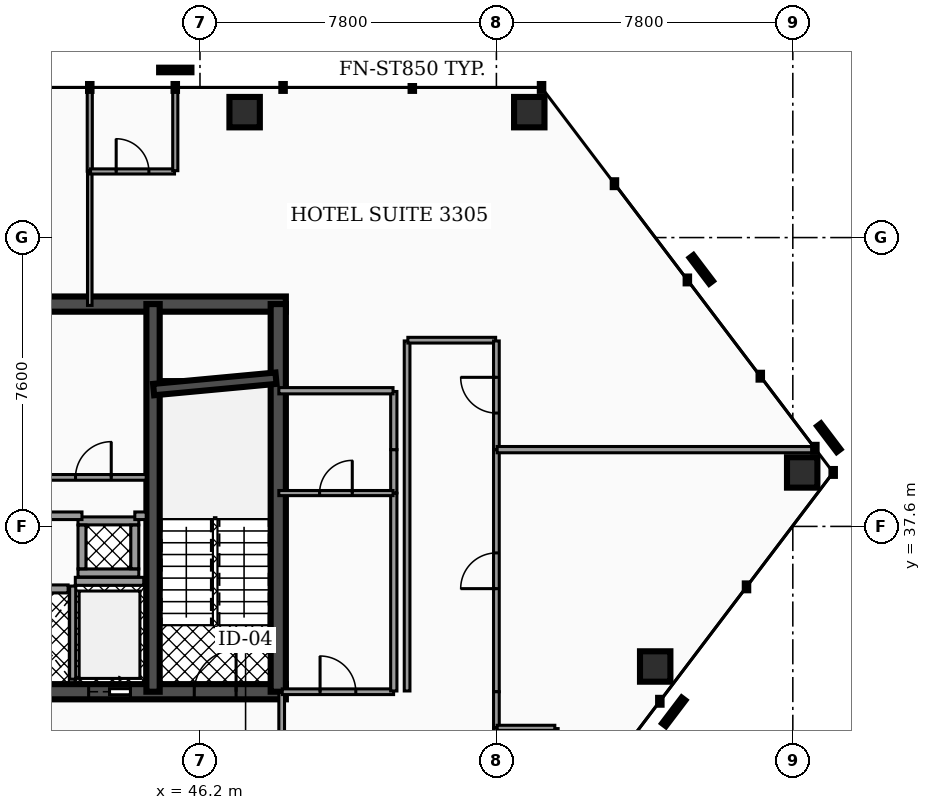
"""IFC4 building model, lengths in metres.
Left out: names, types, materials, properties, quantities, classifications, styles, units other than length and angle.
Written with IfcOpenShell. Run it as: python <this file> out.ifc"""

import sys

from ifc_helpers import new_model, si_unit, direction, frame, frame_2d, origin, origin_2d, place, context, subcontext, project, spatial, rectangle, hollow_rectangle, extrude, element, fill, save


model = new_model("IFC4")
c1 = context("Model", 3, precision=1e-05, world=origin(), true_north=direction((0.0, 1.0)))
c2 = subcontext(c1, "Body", "Model", "MODEL_VIEW")
j1 = project(units=[si_unit("LENGTHUNIT", "METRE"), si_unit("PLANEANGLEUNIT", "RADIAN")], contexts=[c1])
p1 = place(None, origin())
s1 = spatial("IfcSite", under=j1, at=p1, CompositionType="ELEMENT")
p2 = place(p1, origin())
s2 = spatial("IfcBuilding", under=s1, at=p2, CompositionType="ELEMENT")
p3 = place(p2, frame((0.0, 0.0, 138.38)))
s3 = spatial("IfcBuildingStorey", under=s2, at=p3, CompositionType="ELEMENT", Elevation=138.38)
p4 = place(p3, frame((28.4, 43.45, 0.0), z_axis=(0.0, 0.0, 1.0), x_axis=(1.0, 0.0, 0.0)))
e1 = element("IfcWall", 1, at=p4, inside=s3, PredefinedType="SHEAR", context=c2, shape_type="SweptSolid", body=[
    extrude(rectangle(XDim=20.06, YDim=0.4, at=frame_2d((10.03, 0.0))), origin(), (0.0, 0.0, 1.0), 3.5),
])
p5 = place(p3, frame((28.4, 33.25, 0.0), z_axis=(0.0, 0.0, 1.0), x_axis=(1.0, 0.0, 0.0)))
e2 = element("IfcWall", 2, at=p5, inside=s3, PredefinedType="SHEAR", context=c2, shape_type="SweptSolid", body=[
    extrude(rectangle(XDim=20.06, YDim=0.4, at=frame_2d((10.03, 0.0))), origin(), (0.0, 0.0, 1.0), 3.5),
])
p6 = place(p5, frame((4.03, 0.0, 0.0)))
e3 = element("IfcOpeningElement", 3, at=p6, cuts=e2, PredefinedType="OPENING", context=c2, shape_type="SweptSolid", body=[
    extrude(rectangle(XDim=1.1, YDim=2.15, at=frame_2d((0.55, 1.075))), frame((0.0, 0.21, 0.0), z_axis=(0.0, -1.0, 0.0), x_axis=(1.0, 0.0, 0.0)), (0.0, 0.0, 1.0), 0.42),
])
p7 = place(p5, frame((14.87, 0.0, 0.0)))
e4 = element("IfcOpeningElement", 4, at=p7, cuts=e2, PredefinedType="OPENING", context=c2, shape_type="SweptSolid", body=[
    extrude(rectangle(XDim=1.1, YDim=2.15, at=frame_2d((0.55, 1.075))), frame((0.0, 0.21, 0.0), z_axis=(0.0, -1.0, 0.0), x_axis=(1.0, 0.0, 0.0)), (0.0, 0.0, 1.0), 0.42),
])
p8 = place(p5, frame((5.95, 0.0, 0.0)))
e5 = element("IfcOpeningElement", 5, at=p8, cuts=e2, PredefinedType="OPENING", context=c2, shape_type="SweptSolid", body=[
    extrude(rectangle(XDim=1.0, YDim=2.1, at=frame_2d((0.5, 1.05))), frame((0.0, 0.21, 0.0), z_axis=(0.0, -1.0, 0.0), x_axis=(1.0, 0.0, 0.0)), (0.0, 0.0, 1.0), 0.42),
])
p9 = place(p5, frame((7.65, 0.0, 0.0)))
e6 = element("IfcOpeningElement", 6, at=p9, cuts=e2, PredefinedType="OPENING", context=c2, shape_type="SweptSolid", body=[
    extrude(rectangle(XDim=1.0, YDim=2.1, at=frame_2d((0.5, 1.05))), frame((0.0, 0.21, 0.0), z_axis=(0.0, -1.0, 0.0), x_axis=(1.0, 0.0, 0.0)), (0.0, 0.0, 1.0), 0.42),
])
p10 = place(p5, frame((1.31, 0.0, 0.0)))
e7 = element("IfcOpeningElement", 7, at=p10, cuts=e2, PredefinedType="OPENING", context=c2, shape_type="SweptSolid", body=[
    extrude(rectangle(XDim=1.1, YDim=2.2, at=frame_2d((0.55, 1.1))), frame((0.0, 0.21, 0.0), z_axis=(0.0, -1.0, 0.0), x_axis=(1.0, 0.0, 0.0)), (0.0, 0.0, 1.0), 0.42),
])
p11 = place(p5, frame((9.44, 0.0, 0.0)))
e8 = element("IfcOpeningElement", 8, at=p11, cuts=e2, PredefinedType="OPENING", context=c2, shape_type="SweptSolid", body=[
    extrude(rectangle(XDim=1.12, YDim=2.05, at=frame_2d((0.56, 1.025))), frame((0.0, 0.21, 0.0), z_axis=(0.0, -1.0, 0.0), x_axis=(1.0, 0.0, 0.0)), (0.0, 0.0, 1.0), 0.42),
])
p12 = place(p5, frame((17.65, 0.0, 0.0)))
e9 = element("IfcOpeningElement", 9, at=p12, cuts=e2, PredefinedType="OPENING", context=c2, shape_type="SweptSolid", body=[
    extrude(rectangle(XDim=1.1, YDim=2.2, at=frame_2d((0.55, 1.1))), frame((0.0, 0.21, 0.0), z_axis=(0.0, -1.0, 0.0), x_axis=(1.0, 0.0, 0.0)), (0.0, 0.0, 1.0), 0.42),
])
p13 = place(p3, frame((44.965, 33.25, 0.0), z_axis=(0.0, 0.0, 1.0), x_axis=(0.0, 1.0, 0.0)))
e10 = element("IfcWall", 10, at=p13, inside=s3, PredefinedType="SHEAR", context=c2, shape_type="SweptSolid", body=[
    extrude(rectangle(XDim=10.2, YDim=0.35, at=frame_2d((5.1, 0.0))), origin(), (0.0, 0.0, 1.0), 3.5),
])
p14 = place(p3, frame((48.26, 33.25, 0.0), z_axis=(0.0, 0.0, 1.0), x_axis=(0.0, 1.0, 0.0)))
e11 = element("IfcWall", 11, at=p14, inside=s3, PredefinedType="SHEAR", context=c2, shape_type="SweptSolid", body=[
    extrude(rectangle(XDim=10.2, YDim=0.4, at=frame_2d((5.1, 0.0))), origin(), (0.0, 0.0, 1.0), 3.5),
])
p15 = place(p3, frame((44.98, 41.2, 0.0), z_axis=(0.0, 0.0, 1.0), x_axis=(0.995686468965, 0.09278176286, 0.0)))
e12 = element("IfcWall", 12, at=p15, inside=s3, PredefinedType="SHEAR", context=c2, shape_type="SweptSolid", body=[
    extrude(rectangle(XDim=3.234, YDim=0.3, at=frame_2d((1.617, 0.0))), origin(), (0.0, 0.0, 1.0), 3.5),
])
for number, where, z_axis, x_axis in (
    (13, (54.865, 48.5, 0.0), (0.0, 0.0, 1.0), (1.0, 0.0, 0.0)),
    (14, (47.375, 48.5, 0.0), (0.0, 0.0, 1.0), (1.0, 0.0, 0.0)),
    (15, (58.178, 33.914, 0.0), (0.0, 0.0, 1.0), (1.0, 0.0, 0.0)),
    (16, (62.047, 39.02, 0.0), (0.0, 0.0, 1.0), (1.0, 0.0, 0.0)),
):
    element("IfcColumn", number, at=place(p3, frame(where, z_axis=z_axis, x_axis=x_axis)), inside=s3, PredefinedType="COLUMN", context=c2, shape_type="SweptSolid", body=[
        extrude(hollow_rectangle(XDim=0.8, YDim=0.8, WallThickness=0.04, at=origin_2d()), origin(), (0.0, 0.0, 1.0), 3.5),
    ])
p16 = place(p3, frame((42.92, 36.155, 0.0), z_axis=(0.0, 0.0, 1.0), x_axis=(1.0, 0.0, 0.0)))
e17 = element("IfcWall", 17, at=p16, inside=s3, PredefinedType="SOLIDWALL", context=c2, shape_type="SweptSolid", body=[
    extrude(rectangle(XDim=1.8, YDim=0.21, at=frame_2d((0.9, 0.0))), origin(), (0.0, 0.0, 1.0), 2.472),
])
p17 = place(p3, frame((42.85, 33.58, 0.0), z_axis=(0.0, 0.0, 1.0), x_axis=(0.0, 1.0, 0.0)))
e18 = element("IfcWall", 18, at=p17, inside=s3, PredefinedType="SOLIDWALL", context=c2, shape_type="SweptSolid", body=[
    extrude(rectangle(XDim=2.45, YDim=0.16, at=frame_2d((1.225, 0.0))), origin(), (0.0, 0.0, 1.0), 2.472),
])
p18 = place(p3, frame((41.17, 35.955, 0.0), z_axis=(0.0, 0.0, 1.0), x_axis=(1.0, 0.0, 0.0)))
e19 = element("IfcWall", 19, at=p18, inside=s3, PredefinedType="SOLIDWALL", context=c2, shape_type="SweptSolid", body=[
    extrude(rectangle(XDim=1.56, YDim=0.21, at=frame_2d((0.78, 0.0))), origin(), (0.0, 0.0, 1.0), 2.472),
])
for number, where, z_axis, x_axis in (
    (20, (42.99, 36.375, 0.0), (0.0, 0.0, 1.0), (1.0, 0.0, 0.0)),
    (21, (42.99, 37.745, 0.0), (0.0, 0.0, 1.0), (1.0, 0.0, 0.0)),
):
    element("IfcWall", number, at=place(p3, frame(where, z_axis=z_axis, x_axis=x_axis)), inside=s3, PredefinedType="SOLIDWALL", context=c2, shape_type="SweptSolid", body=[
        extrude(rectangle(XDim=1.6, YDim=0.21, at=frame_2d((0.8, 0.0))), origin(), (0.0, 0.0, 1.0), 3.5),
    ])
for number, where, z_axis, x_axis in (
    (22, (43.095, 36.485, 0.0), (0.0, 0.0, 1.0), (0.0, 1.0, 0.0)),
    (23, (44.485, 36.485, 0.0), (0.0, 0.0, 1.0), (0.0, 1.0, 0.0)),
):
    element("IfcWall", number, at=place(p3, frame(where, z_axis=z_axis, x_axis=x_axis)), inside=s3, PredefinedType="SOLIDWALL", context=c2, shape_type="SweptSolid", body=[
        extrude(rectangle(XDim=1.15, YDim=0.21, at=frame_2d((0.575, 0.0))), origin(), (0.0, 0.0, 1.0), 3.5),
    ])
p19 = place(p3, frame((42.005, 38.89, 0.0), z_axis=(0.0, 0.0, 1.0), x_axis=(1.0, 0.0, 0.0)))
e24 = element("IfcWall", 24, at=p19, inside=s3, PredefinedType="PARTITIONING", context=c2, shape_type="SweptSolid", body=[
    extrude(rectangle(XDim=2.78, YDim=0.15, at=frame_2d((1.39, 0.0))), origin(), (0.0, 0.0, 1.0), 2.457),
])
p20 = place(p19, frame((0.92, 0.0, 0.0)))
e25 = element("IfcOpeningElement", 25, at=p20, cuts=e24, PredefinedType="OPENING", context=c2, shape_type="SweptSolid", body=[
    extrude(rectangle(XDim=0.94, YDim=2.05, at=frame_2d((0.47, 1.025))), frame((0.0, 0.085, 0.0), z_axis=(0.0, -1.0, 0.0), x_axis=(1.0, 0.0, 0.0)), (0.0, 0.0, 1.0), 0.17),
])
p21 = place(p3, frame((39.27, 37.88, 0.0), z_axis=(0.0, 0.0, 1.0), x_axis=(1.0, 0.0, 0.0)))
e26 = element("IfcWall", 26, at=p21, inside=s3, PredefinedType="PARTITIONING", context=c2, shape_type="SweptSolid", body=[
    extrude(rectangle(XDim=3.825, YDim=0.2, at=frame_2d((1.913, 0.0))), origin(), (0.0, 0.0, 1.0), 2.457),
])
p22 = place(p3, frame((44.485, 37.88, 0.0), z_axis=(0.0, 0.0, 1.0), x_axis=(1.0, 0.0, 0.0)))
e27 = element("IfcWall", 27, at=p22, inside=s3, PredefinedType="PARTITIONING", context=c2, shape_type="SweptSolid", body=[
    extrude(rectangle(XDim=0.3, YDim=0.2, at=frame_2d((0.15, 0.0))), origin(), (0.0, 0.0, 1.0), 2.457),
])
p23 = place(p3, frame((48.35, 30.17, 0.0), z_axis=(0.0, 0.0, 1.0), x_axis=(0.0, 1.0, 0.0)))
e28 = element("IfcWall", 28, at=p23, inside=s3, PredefinedType="PARTITIONING", context=c2, shape_type="SweptSolid", body=[
    extrude(rectangle(XDim=3.06, YDim=0.15, at=frame_2d((1.53, 0.0))), origin(), (0.0, 0.0, 1.0), 2.457),
])
p24 = place(p23, frame((1.06, 0.0, 0.0)))
e29 = element("IfcOpeningElement", 29, at=p24, cuts=e28, PredefinedType="OPENING", context=c2, shape_type="SweptSolid", body=[
    extrude(rectangle(XDim=0.94, YDim=2.05, at=frame_2d((0.47, 1.025))), frame((0.0, 0.085, 0.0), z_axis=(0.0, -1.0, 0.0), x_axis=(1.0, 0.0, 0.0)), (0.0, 0.0, 1.0), 0.17),
])
p25 = place(p3, frame((54.0, 33.25, 0.0), z_axis=(0.0, 0.0, 1.0), x_axis=(0.0, 1.0, 0.0)))
e30 = element("IfcWall", 30, at=p25, inside=s3, PredefinedType="PARTITIONING", context=c2, shape_type="SweptSolid", body=[
    extrude(rectangle(XDim=6.365, YDim=0.15, at=frame_2d((3.183, 0.0))), origin(), (0.0, 0.0, 1.0), 2.457),
])
p26 = place(p25, frame((2.712, 0.0, 0.0)))
e31 = element("IfcOpeningElement", 31, at=p26, cuts=e30, PredefinedType="OPENING", context=c2, shape_type="SweptSolid", body=[
    extrude(rectangle(XDim=0.94, YDim=2.05, at=frame_2d((0.47, 1.025))), frame((0.0, 0.085, 0.0), z_axis=(0.0, -1.0, 0.0), x_axis=(1.0, 0.0, 0.0)), (0.0, 0.0, 1.0), 0.17),
])
p27 = place(p3, frame((54.0, 32.305, 0.0), z_axis=(0.0, 0.0, 1.0), x_axis=(0.0, 1.0, 0.0)))
e32 = element("IfcWall", 32, at=p27, inside=s3, PredefinedType="PARTITIONING", context=c2, shape_type="SweptSolid", body=[
    extrude(rectangle(XDim=0.945, YDim=0.15, at=frame_2d((0.473, 0.0))), origin(), (0.0, 0.0, 1.0), 2.457),
])
p28 = place(p3, frame((54.0, 31.085, 0.0), z_axis=(0.0, 0.0, 1.0), x_axis=(0.0, 1.0, 0.0)))
e33 = element("IfcWall", 33, at=p28, inside=s3, PredefinedType="PARTITIONING", context=c2, shape_type="SweptSolid", body=[
    extrude(rectangle(XDim=1.21, YDim=0.15, at=frame_2d((0.605, 0.0))), origin(), (0.0, 0.0, 1.0), 2.457),
])
p29 = place(p3, frame((51.65, 33.27, 0.0), z_axis=(0.0, 0.0, 1.0), x_axis=(0.0, 1.0, 0.0)))
e34 = element("IfcWall", 34, at=p29, inside=s3, PredefinedType="PARTITIONING", context=c2, shape_type="SweptSolid", body=[
    extrude(rectangle(XDim=9.21, YDim=0.15, at=frame_2d((4.605, 0.0))), origin(), (0.0, 0.0, 1.0), 2.457),
])
p30 = place(p3, frame((51.67, 42.5, 0.0), z_axis=(0.0, 0.0, 1.0), x_axis=(1.0, 0.0, 0.0)))
e35 = element("IfcWall", 35, at=p30, inside=s3, PredefinedType="PARTITIONING", context=c2, shape_type="SweptSolid", body=[
    extrude(rectangle(XDim=2.31, YDim=0.15, at=frame_2d((1.155, 0.0))), origin(), (0.0, 0.0, 1.0), 2.457),
])
p31 = place(p3, frame((54.0, 39.625, 0.0), z_axis=(0.0, 0.0, 1.0), x_axis=(0.0, 1.0, 0.0)))
e36 = element("IfcWall", 36, at=p31, inside=s3, PredefinedType="PARTITIONING", context=c2, shape_type="SweptSolid", body=[
    extrude(rectangle(XDim=2.855, YDim=0.15, at=frame_2d((1.427, 0.0))), origin(), (0.0, 0.0, 1.0), 2.457),
])
p32 = place(p31, frame((0.958, 0.0, 0.0)))
e37 = element("IfcOpeningElement", 37, at=p32, cuts=e36, PredefinedType="OPENING", context=c2, shape_type="SweptSolid", body=[
    extrude(rectangle(XDim=0.94, YDim=2.05, at=frame_2d((0.47, 1.025))), frame((0.0, 0.085, 0.0), z_axis=(0.0, -1.0, 0.0), x_axis=(1.0, 0.0, 0.0)), (0.0, 0.0, 1.0), 0.17),
])
p33 = place(p3, frame((48.365, 33.25, 0.0), z_axis=(0.0, 0.0, 1.0), x_axis=(1.0, 0.0, 0.0)))
e38 = element("IfcWall", 38, at=p33, inside=s3, PredefinedType="PARTITIONING", context=c2, shape_type="SweptSolid", body=[
    extrude(rectangle(XDim=2.93, YDim=0.15, at=frame_2d((1.465, 0.0))), origin(), (0.0, 0.0, 1.0), 2.457),
])
p34 = place(p33, frame((0.995, 0.0, 0.0)))
e39 = element("IfcOpeningElement", 39, at=p34, cuts=e38, PredefinedType="OPENING", context=c2, shape_type="SweptSolid", body=[
    extrude(rectangle(XDim=0.94, YDim=2.05, at=frame_2d((0.47, 1.025))), frame((0.0, 0.085, 0.0), z_axis=(0.0, -1.0, 0.0), x_axis=(1.0, 0.0, 0.0)), (0.0, 0.0, 1.0), 0.17),
])
p35 = place(p3, frame((43.3, 43.415, 0.0), z_axis=(0.0, 0.0, 1.0), x_axis=(0.0, 1.0, 0.0)))
e40 = element("IfcWall", 40, at=p35, inside=s3, PredefinedType="PARTITIONING", context=c2, shape_type="SweptSolid", body=[
    extrude(rectangle(XDim=3.52, YDim=0.12, at=frame_2d((1.76, 0.0))), origin(), (0.0, 0.0, 1.0), 2.457),
])
p36 = place(p3, frame((43.3, 46.945, 0.0), z_axis=(0.0, 0.0, 1.0), x_axis=(0.0, 1.0, 0.0)))
e41 = element("IfcWall", 41, at=p36, inside=s3, PredefinedType="PARTITIONING", context=c2, shape_type="SweptSolid", body=[
    extrude(rectangle(XDim=2.19, YDim=0.135, at=frame_2d((1.095, 0.0))), origin(), (0.0, 0.0, 1.0), 2.457),
])
p37 = place(p3, frame((55.557, 30.17, 0.0), z_axis=(0.0, 0.0, 1.0), x_axis=(0.0, 1.0, 0.0)))
e42 = element("IfcWall", 42, at=p37, inside=s3, PredefinedType="PARTITIONING", context=c2, shape_type="SweptSolid", body=[
    extrude(rectangle(XDim=2.11, YDim=0.135, at=frame_2d((1.055, 0.0))), origin(), (0.0, 0.0, 1.0), 2.457),
])
p38 = place(p37, frame((0.625, 0.0, 0.0)))
e43 = element("IfcOpeningElement", 43, at=p38, cuts=e42, PredefinedType="OPENING", context=c2, shape_type="SweptSolid", body=[
    extrude(rectangle(XDim=0.86, YDim=2.05, at=frame_2d((0.43, 1.025))), frame((0.0, 0.077, 0.0), z_axis=(0.0, -1.0, 0.0), x_axis=(1.0, 0.0, 0.0)), (0.0, 0.0, 1.0), 0.155),
])
p39 = place(p3, frame((54.02, 32.3, 0.0), z_axis=(0.0, 0.0, 1.0), x_axis=(1.0, 0.0, 0.0)))
e44 = element("IfcWall", 44, at=p39, inside=s3, PredefinedType="PARTITIONING", context=c2, shape_type="SweptSolid", body=[
    extrude(rectangle(XDim=1.517, YDim=0.135, at=frame_2d((0.759, 0.0))), origin(), (0.0, 0.0, 1.0), 2.457),
])
p40 = place(p3, frame((54.02, 39.62, 0.0), z_axis=(0.0, 0.0, 1.0), x_axis=(1.0, 0.0, 0.0)))
e45 = element("IfcWall", 45, at=p40, inside=s3, PredefinedType="PARTITIONING", context=c2, shape_type="SweptSolid", body=[
    extrude(rectangle(XDim=8.373, YDim=0.165, at=frame_2d((4.186, 0.0))), origin(), (0.0, 0.0, 1.0), 2.457),
])
p41 = place(p3, frame((43.32, 46.94, 0.0), z_axis=(0.0, 0.0, 1.0), x_axis=(1.0, 0.0, 0.0)))
e46 = element("IfcWall", 46, at=p41, inside=s3, PredefinedType="PARTITIONING", context=c2, shape_type="SweptSolid", body=[
    extrude(rectangle(XDim=2.21, YDim=0.135, at=frame_2d((1.105, 0.0))), origin(), (0.0, 0.0, 1.0), 2.457),
])
p42 = place(p41, frame((0.675, 0.0, 0.0)))
e47 = element("IfcOpeningElement", 47, at=p42, cuts=e46, PredefinedType="OPENING", context=c2, shape_type="SweptSolid", body=[
    extrude(rectangle(XDim=0.86, YDim=2.05, at=frame_2d((0.43, 1.025))), frame((0.0, 0.077, 0.0), z_axis=(0.0, -1.0, 0.0), x_axis=(1.0, 0.0, 0.0)), (0.0, 0.0, 1.0), 0.155),
])
p43 = place(p3, frame((45.55, 46.96, 0.0), z_axis=(0.0, 0.0, 1.0), x_axis=(0.0, 1.0, 0.0)))
e48 = element("IfcWall", 48, at=p43, inside=s3, PredefinedType="PARTITIONING", context=c2, shape_type="SweptSolid", body=[
    extrude(rectangle(XDim=2.175, YDim=0.135, at=frame_2d((1.087, 0.0))), origin(), (0.0, 0.0, 1.0), 2.457),
])
p44 = place(p3, frame((51.3, 33.27, 0.0), z_axis=(0.0, 0.0, 1.0), x_axis=(0.0, 1.0, 0.0)))
e49 = element("IfcWall", 49, at=p44, inside=s3, PredefinedType="PARTITIONING", context=c2, shape_type="SweptSolid", body=[
    extrude(rectangle(XDim=5.202, YDim=0.165, at=frame_2d((2.601, 0.0))), origin(), (0.0, 0.0, 1.0), 2.457),
])
p45 = place(p3, frame((51.3, 38.482, 0.0), z_axis=(0.0, 0.0, 1.0), x_axis=(0.0, 1.0, 0.0)))
e50 = element("IfcWall", 50, at=p45, inside=s3, PredefinedType="PARTITIONING", context=c2, shape_type="SweptSolid", body=[
    extrude(rectangle(XDim=1.138, YDim=0.165, at=frame_2d((0.569, 0.0))), origin(), (0.0, 0.0, 1.0), 2.457),
])
p46 = place(p3, frame((51.3, 39.62, 0.0), z_axis=(0.0, 0.0, 1.0), x_axis=(0.0, 1.0, 0.0)))
e51 = element("IfcWall", 51, at=p46, inside=s3, PredefinedType="PARTITIONING", context=c2, shape_type="SweptSolid", body=[
    extrude(rectangle(XDim=1.53, YDim=0.165, at=frame_2d((0.765, 0.0))), origin(), (0.0, 0.0, 1.0), 2.457),
])
p47 = place(p3, frame((48.275, 41.17, 0.0), z_axis=(0.0, 0.0, 1.0), x_axis=(1.0, 0.0, 0.0)))
e52 = element("IfcWall", 52, at=p47, inside=s3, PredefinedType="PARTITIONING", context=c2, shape_type="SweptSolid", body=[
    extrude(rectangle(XDim=3.005, YDim=0.165, at=frame_2d((1.502, 0.0))), origin(), (0.0, 0.0, 1.0), 2.457),
])
p48 = place(p3, frame((48.275, 38.477, 0.0), z_axis=(0.0, 0.0, 1.0), x_axis=(1.0, 0.0, 0.0)))
e53 = element("IfcWall", 53, at=p48, inside=s3, PredefinedType="PARTITIONING", context=c2, shape_type="SweptSolid", body=[
    extrude(rectangle(XDim=3.005, YDim=0.135, at=frame_2d((1.502, 0.0))), origin(), (0.0, 0.0, 1.0), 2.457),
])
p49 = place(p48, frame((1.073, 0.0, 0.0)))
e54 = element("IfcOpeningElement", 54, at=p49, cuts=e53, PredefinedType="OPENING", context=c2, shape_type="SweptSolid", body=[
    extrude(rectangle(XDim=0.86, YDim=2.05, at=frame_2d((0.43, 1.025))), frame((0.0, 0.077, 0.0), z_axis=(0.0, -1.0, 0.0), x_axis=(1.0, 0.0, 0.0)), (0.0, 0.0, 1.0), 0.155),
])
p50 = place(p7, origin())
e55 = element("IfcDoor", 55, at=p50, inside=s3, OperationType="SLIDING_TO_RIGHT", PredefinedType="DOOR", context=c2, shape_type="SweptSolid", body=[
    extrude(rectangle(XDim=1.1, YDim=2.15, at=frame_2d((0.55, 1.075))), frame((0.0, 0.025, 0.0), z_axis=(0.0, -1.0, 0.0), x_axis=(1.0, 0.0, 0.0)), (0.0, 0.0, 1.0), 0.05),
])
fill(e4, e55)
p51 = place(p12, origin())
e56 = element("IfcDoor", 56, at=p51, inside=s3, OperationType="SINGLE_SWING_RIGHT", PredefinedType="DOOR", context=c2, shape_type="SweptSolid", body=[
    extrude(rectangle(XDim=1.1, YDim=2.2, at=frame_2d((0.55, 1.1))), frame((0.0, 0.025, 0.0), z_axis=(0.0, -1.0, 0.0), x_axis=(1.0, 0.0, 0.0)), (0.0, 0.0, 1.0), 0.05),
])
fill(e9, e56)
p52 = place(p20, origin())
e57 = element("IfcDoor", 57, at=p52, inside=s3, OperationType="SINGLE_SWING_RIGHT", PredefinedType="DOOR", context=c2, shape_type="SweptSolid", body=[
    extrude(rectangle(XDim=0.94, YDim=2.05, at=frame_2d((0.47, 1.025))), frame((0.0, 0.025, 0.0), z_axis=(0.0, -1.0, 0.0), x_axis=(1.0, 0.0, 0.0)), (0.0, 0.0, 1.0), 0.05),
])
fill(e25, e57)
p53 = place(p26, origin())
e58 = element("IfcDoor", 58, at=p53, inside=s3, OperationType="SINGLE_SWING_LEFT", PredefinedType="DOOR", context=c2, shape_type="SweptSolid", body=[
    extrude(rectangle(XDim=0.94, YDim=2.05, at=frame_2d((0.47, 1.025))), frame((0.0, 0.025, 0.0), z_axis=(0.0, -1.0, 0.0), x_axis=(1.0, 0.0, 0.0)), (0.0, 0.0, 1.0), 0.05),
])
fill(e31, e58)
p54 = place(p32, origin())
e59 = element("IfcDoor", 59, at=p54, inside=s3, OperationType="SINGLE_SWING_RIGHT", PredefinedType="DOOR", context=c2, shape_type="SweptSolid", body=[
    extrude(rectangle(XDim=0.94, YDim=2.05, at=frame_2d((0.47, 1.025))), frame((0.0, 0.025, 0.0), z_axis=(0.0, -1.0, 0.0), x_axis=(1.0, 0.0, 0.0)), (0.0, 0.0, 1.0), 0.05),
])
fill(e37, e59)
p55 = place(p34, origin())
e60 = element("IfcDoor", 60, at=p55, inside=s3, OperationType="SINGLE_SWING_LEFT", PredefinedType="DOOR", context=c2, shape_type="SweptSolid", body=[
    extrude(rectangle(XDim=0.94, YDim=2.05, at=frame_2d((0.47, 1.025))), frame((0.0, 0.025, 0.0), z_axis=(0.0, -1.0, 0.0), x_axis=(1.0, 0.0, 0.0)), (0.0, 0.0, 1.0), 0.05),
])
fill(e39, e60)
p56 = place(p42, origin())
e61 = element("IfcDoor", 61, at=p56, inside=s3, OperationType="SINGLE_SWING_LEFT", PredefinedType="DOOR", context=c2, shape_type="SweptSolid", body=[
    extrude(rectangle(XDim=0.86, YDim=2.05, at=frame_2d((0.43, 1.025))), frame((0.0, 0.025, 0.0), z_axis=(0.0, -1.0, 0.0), x_axis=(1.0, 0.0, 0.0)), (0.0, 0.0, 1.0), 0.05),
])
fill(e47, e61)
p57 = place(p49, origin())
e62 = element("IfcDoor", 62, at=p57, inside=s3, OperationType="SINGLE_SWING_RIGHT", PredefinedType="DOOR", context=c2, shape_type="SweptSolid", body=[
    extrude(rectangle(XDim=0.86, YDim=2.05, at=frame_2d((0.43, 1.025))), frame((0.0, 0.025, 0.0), z_axis=(0.0, -1.0, 0.0), x_axis=(1.0, 0.0, 0.0)), (0.0, 0.0, 1.0), 0.05),
])
fill(e54, e62)
save(model, sys.argv[1])
